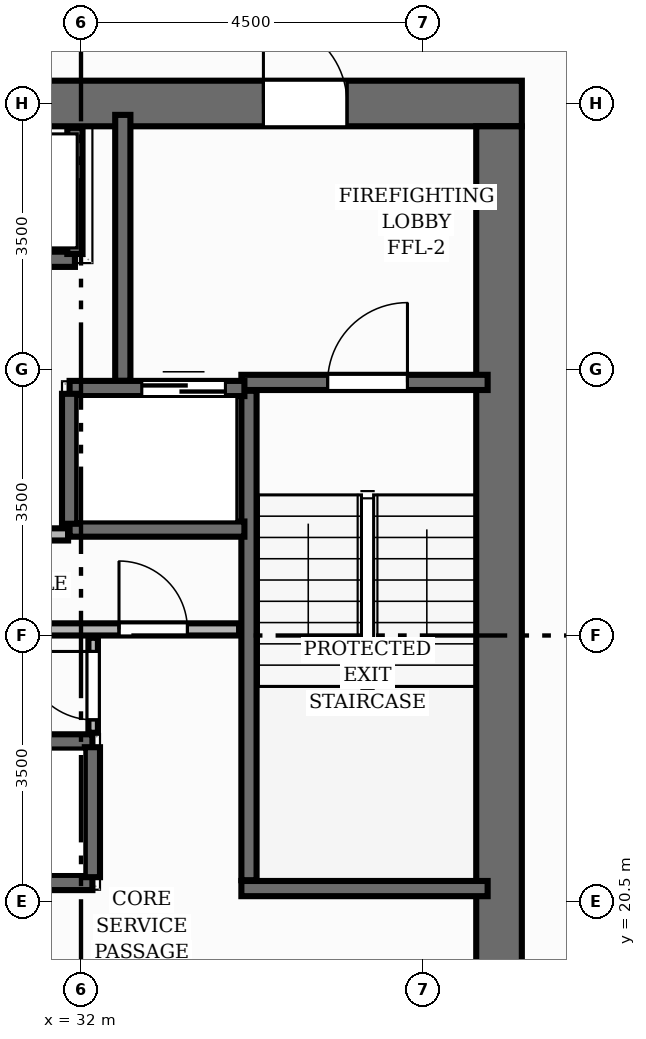
"""IFC4 building model, lengths in metres.
Left out: names, types, materials, properties, quantities, classifications, styles, units other than length and angle.
Written with IfcOpenShell. Run it as: python <this file> out.ifc"""

import sys

from ifc_helpers import new_model, si_unit, direction, frame, frame_2d, origin, place, context, subcontext, project, spatial, rectangle, extrude, element, fill, save


model = new_model("IFC4")
c1 = context("Model", 3, precision=1e-05, world=origin(), true_north=direction((0.0, 1.0)))
c2 = subcontext(c1, "Body", "Model", "MODEL_VIEW")
j1 = project(units=[si_unit("LENGTHUNIT", "METRE"), si_unit("PLANEANGLEUNIT", "RADIAN")], contexts=[c1])
p1 = place(None, origin())
s1 = spatial("IfcSite", under=j1, at=p1, CompositionType="ELEMENT")
p2 = place(p1, origin())
s2 = spatial("IfcBuilding", under=s1, at=p2, CompositionType="ELEMENT")
p3 = place(p2, frame((0.0, 0.0, 163.04)))
s3 = spatial("IfcBuildingStorey", under=s2, at=p3, CompositionType="ELEMENT", Elevation=163.04)
p4 = place(p3, frame((22.7, 31.0, 0.0), z_axis=(0.0, 0.0, 1.0), x_axis=(1.0, 0.0, 0.0)))
e1 = element("IfcWall", 1, at=p4, inside=s3, PredefinedType="SHEAR", context=c2, shape_type="SweptSolid", body=[
    extrude(rectangle(XDim=15.1, YDim=0.6, at=frame_2d((7.55, 0.0))), origin(), (0.0, 0.0, 1.0), 3.2),
])
p5 = place(p4, frame((11.7, 0.0, 0.0)))
e2 = element("IfcOpeningElement", 2, at=p5, cuts=e1, PredefinedType="OPENING", context=c2, shape_type="SweptSolid", body=[
    extrude(rectangle(XDim=1.1, YDim=2.15, at=frame_2d((0.55, 1.075))), frame((0.0, 0.31, 0.0), z_axis=(0.0, -1.0, 0.0), x_axis=(1.0, 0.0, 0.0)), (0.0, 0.0, 1.0), 0.62),
])
p6 = place(p4, frame((4.325, 0.0, 0.0)))
e3 = element("IfcOpeningElement", 3, at=p6, cuts=e1, PredefinedType="OPENING", context=c2, shape_type="SweptSolid", body=[
    extrude(rectangle(XDim=1.05, YDim=2.15, at=frame_2d((0.525, 1.075))), frame((0.0, 0.31, 0.0), z_axis=(0.0, -1.0, 0.0), x_axis=(1.0, 0.0, 0.0)), (0.0, 0.0, 1.0), 0.62),
])
p7 = place(p4, frame((6.075, 0.0, 0.0)))
e4 = element("IfcOpeningElement", 4, at=p7, cuts=e1, PredefinedType="OPENING", context=c2, shape_type="SweptSolid", body=[
    extrude(rectangle(XDim=1.05, YDim=2.15, at=frame_2d((0.525, 1.075))), frame((0.0, 0.31, 0.0), z_axis=(0.0, -1.0, 0.0), x_axis=(1.0, 0.0, 0.0)), (0.0, 0.0, 1.0), 0.62),
])
p8 = place(p4, frame((7.825, 0.0, 0.0)))
e5 = element("IfcOpeningElement", 5, at=p8, cuts=e1, PredefinedType="OPENING", context=c2, shape_type="SweptSolid", body=[
    extrude(rectangle(XDim=1.05, YDim=2.15, at=frame_2d((0.525, 1.075))), frame((0.0, 0.31, 0.0), z_axis=(0.0, -1.0, 0.0), x_axis=(1.0, 0.0, 0.0)), (0.0, 0.0, 1.0), 0.62),
])
p9 = place(p3, frame((37.5, 17.3, 0.0), z_axis=(0.0, 0.0, 1.0), x_axis=(0.0, 1.0, 0.0)))
e6 = element("IfcWall", 6, at=p9, inside=s3, PredefinedType="SHEAR", context=c2, shape_type="SweptSolid", body=[
    extrude(rectangle(XDim=13.4, YDim=0.6, at=frame_2d((6.7, 0.0))), origin(), (0.0, 0.0, 1.0), 3.2),
])
p10 = place(p3, frame((34.21, 20.78, 0.0), z_axis=(0.0, 0.0, 1.0), x_axis=(0.0, 1.0, 0.0)))
e7 = element("IfcWall", 7, at=p10, inside=s3, PredefinedType="SHEAR", context=c2, shape_type="SweptSolid", body=[
    extrude(rectangle(XDim=6.44, YDim=0.2, at=frame_2d((3.22, 0.0))), origin(), (0.0, 0.0, 1.0), 3.2),
])
p11 = place(p3, frame((34.11, 20.67, 0.0), z_axis=(0.0, 0.0, 1.0), x_axis=(1.0, 0.0, 0.0)))
e8 = element("IfcWall", 8, at=p11, inside=s3, PredefinedType="SHEAR", context=c2, shape_type="SweptSolid", body=[
    extrude(rectangle(XDim=3.24, YDim=0.2, at=frame_2d((1.62, 0.0))), origin(), (0.0, 0.0, 1.0), 3.2),
])
p12 = place(p3, frame((34.11, 27.33, 0.0), z_axis=(0.0, 0.0, 1.0), x_axis=(1.0, 0.0, 0.0)))
e9 = element("IfcWall", 9, at=p12, inside=s3, PredefinedType="SHEAR", context=c2, shape_type="SweptSolid", body=[
    extrude(rectangle(XDim=3.24, YDim=0.2, at=frame_2d((1.62, 0.0))), origin(), (0.0, 0.0, 1.0), 3.2),
])
p13 = place(p12, frame((1.135, 0.0, 0.0)))
e10 = element("IfcOpeningElement", 10, at=p13, cuts=e9, PredefinedType="OPENING", context=c2, shape_type="SweptSolid", body=[
    extrude(rectangle(XDim=1.05, YDim=2.15, at=frame_2d((0.525, 1.075))), frame((0.0, 0.11, 0.0), z_axis=(0.0, -1.0, 0.0), x_axis=(1.0, 0.0, 0.0)), (0.0, 0.0, 1.0), 0.22),
])
p14 = place(p3, frame((32.55, 27.35, 0.0), z_axis=(0.0, 0.0, 1.0), x_axis=(0.0, 1.0, 0.0)))
e11 = element("IfcWall", 11, at=p14, inside=s3, PredefinedType="SHEAR", context=c2, shape_type="SweptSolid", body=[
    extrude(rectangle(XDim=3.5, YDim=0.2, at=frame_2d((1.75, 0.0))), origin(), (0.0, 0.0, 1.0), 3.2),
])
p15 = place(p3, frame((29.85, 20.75, 0.0), z_axis=(0.0, 0.0, 1.0), x_axis=(1.0, 0.0, 0.0)))
e12 = element("IfcWall", 12, at=p15, inside=s3, PredefinedType="SHEAR", context=c2, shape_type="SweptSolid", body=[
    extrude(rectangle(XDim=2.3, YDim=0.2, at=frame_2d((1.15, 0.0))), origin(), (0.0, 0.0, 1.0), 3.2),
])
p16 = place(p15, frame((0.25, 0.0, 0.0)))
e13 = element("IfcOpeningElement", 13, at=p16, cuts=e12, PredefinedType="OPENING", context=c2, shape_type="SweptSolid", body=[
    extrude(rectangle(XDim=1.1, YDim=2.15, at=frame_2d((0.55, 1.075))), frame((0.0, 0.11, 0.0), z_axis=(0.0, -1.0, 0.0), x_axis=(1.0, 0.0, 0.0)), (0.0, 0.0, 1.0), 0.22),
])
p17 = place(p3, frame((29.85, 22.6, 0.0), z_axis=(0.0, 0.0, 1.0), x_axis=(1.0, 0.0, 0.0)))
e14 = element("IfcWall", 14, at=p17, inside=s3, PredefinedType="SHEAR", context=c2, shape_type="SweptSolid", body=[
    extrude(rectangle(XDim=2.3, YDim=0.2, at=frame_2d((1.15, 0.0))), origin(), (0.0, 0.0, 1.0), 3.2),
])
p18 = place(p3, frame((32.15, 20.82, 0.0), z_axis=(0.0, 0.0, 1.0), x_axis=(0.0, 1.0, 0.0)))
e15 = element("IfcWall", 15, at=p18, inside=s3, PredefinedType="SHEAR", context=c2, shape_type="SweptSolid", body=[
    extrude(rectangle(XDim=1.71, YDim=0.2, at=frame_2d((0.855, 0.0))), origin(), (0.0, 0.0, 1.0), 3.2),
])
p19 = place(p3, frame((31.85, 27.25, 0.0), z_axis=(0.0, 0.0, 1.0), x_axis=(1.0, 0.0, 0.0)))
e16 = element("IfcWall", 16, at=p19, inside=s3, PredefinedType="SHEAR", context=c2, shape_type="SweptSolid", body=[
    extrude(rectangle(XDim=2.3, YDim=0.2, at=frame_2d((1.15, 0.0))), origin(), (0.0, 0.0, 1.0), 3.2),
])
p20 = place(p19, frame((0.95, 0.0, 0.0)))
e17 = element("IfcOpeningElement", 17, at=p20, cuts=e16, PredefinedType="OPENING", context=c2, shape_type="SweptSolid", body=[
    extrude(rectangle(XDim=1.1, YDim=2.15, at=frame_2d((0.55, 1.075))), frame((0.0, 0.11, 0.0), z_axis=(0.0, -1.0, 0.0), x_axis=(1.0, 0.0, 0.0)), (0.0, 0.0, 1.0), 0.22),
])
p21 = place(p3, frame((31.85, 25.4, 0.0), z_axis=(0.0, 0.0, 1.0), x_axis=(1.0, 0.0, 0.0)))
e18 = element("IfcWall", 18, at=p21, inside=s3, PredefinedType="SHEAR", context=c2, shape_type="SweptSolid", body=[
    extrude(rectangle(XDim=2.3, YDim=0.2, at=frame_2d((1.15, 0.0))), origin(), (0.0, 0.0, 1.0), 3.2),
])
p22 = place(p3, frame((31.85, 25.47, 0.0), z_axis=(0.0, 0.0, 1.0), x_axis=(0.0, 1.0, 0.0)))
e19 = element("IfcWall", 19, at=p22, inside=s3, PredefinedType="SHEAR", context=c2, shape_type="SweptSolid", body=[
    extrude(rectangle(XDim=1.71, YDim=0.2, at=frame_2d((0.855, 0.0))), origin(), (0.0, 0.0, 1.0), 3.2),
])
p23 = place(p3, frame((26.68, 28.95, 0.0), z_axis=(0.0, 0.0, 1.0), x_axis=(1.0, 0.0, 0.0)))
e20 = element("IfcWall", 20, at=p23, inside=s3, PredefinedType="SHEAR", context=c2, shape_type="SweptSolid", body=[
    extrude(rectangle(XDim=5.24, YDim=0.2, at=frame_2d((2.62, 0.0))), origin(), (0.0, 0.0, 1.0), 3.2),
])
p24 = place(p3, frame((31.92, 29.02, 0.0), z_axis=(0.0, 0.0, 1.0), x_axis=(0.0, 1.0, 0.0)))
e21 = element("IfcWall", 21, at=p24, inside=s3, PredefinedType="SHEAR", context=c2, shape_type="SweptSolid", body=[
    extrude(rectangle(XDim=1.66, YDim=0.2, at=frame_2d((0.83, 0.0))), origin(), (0.0, 0.0, 1.0), 3.2),
])
p25 = place(p3, frame((29.95, 24.08, 0.0), z_axis=(0.0, 0.0, 1.0), x_axis=(1.0, 0.0, 0.0)))
e22 = element("IfcWall", 22, at=p25, inside=s3, PredefinedType="PLUMBINGWALL", context=c2, shape_type="SweptSolid", body=[
    extrude(rectangle(XDim=4.13, YDim=0.16, at=frame_2d((2.065, 0.0))), origin(), (0.0, 0.0, 1.0), 2.955),
])
p26 = place(p25, frame((2.55, 0.0, 0.0)))
e23 = element("IfcOpeningElement", 23, at=p26, cuts=e22, PredefinedType="OPENING", context=c2, shape_type="SweptSolid", body=[
    extrude(rectangle(XDim=0.9, YDim=2.1, at=frame_2d((0.45, 1.05))), frame((0.0, 0.09, 0.0), z_axis=(0.0, -1.0, 0.0), x_axis=(1.0, 0.0, 0.0)), (0.0, 0.0, 1.0), 0.18),
])
p27 = place(p3, frame((32.16, 22.72, 0.0), z_axis=(0.0, 0.0, 1.0), x_axis=(0.0, 1.0, 0.0)))
e24 = element("IfcWall", 24, at=p27, inside=s3, PredefinedType="PARTITIONING", context=c2, shape_type="SweptSolid", body=[
    extrude(rectangle(XDim=1.25, YDim=0.125, at=frame_2d((0.625, 0.0))), origin(), (0.0, 0.0, 1.0), 2.955),
])
p28 = place(p27, frame((0.17, 0.0, 0.0)))
e25 = element("IfcOpeningElement", 25, at=p28, cuts=e24, PredefinedType="OPENING", context=c2, shape_type="SweptSolid", body=[
    extrude(rectangle(XDim=0.9, YDim=2.1, at=frame_2d((0.45, 1.05))), frame((0.0, 0.073, 0.0), z_axis=(0.0, -1.0, 0.0), x_axis=(1.0, 0.0, 0.0)), (0.0, 0.0, 1.0), 0.145),
])
p29 = place(p3, frame((29.89, 25.33, 0.0), z_axis=(0.0, 0.0, 1.0), x_axis=(1.0, 0.0, 0.0)))
e26 = element("IfcWall", 26, at=p29, inside=s3, PredefinedType="PLUMBINGWALL", context=c2, shape_type="SweptSolid", body=[
    extrude(rectangle(XDim=1.94, YDim=0.16, at=frame_2d((0.97, 0.0))), origin(), (0.0, 0.0, 1.0), 2.955),
])
p30 = place(p13, origin())
e27 = element("IfcDoor", 27, at=p30, inside=s3, OperationType="SINGLE_SWING_RIGHT", PredefinedType="DOOR", context=c2, shape_type="SweptSolid", body=[
    extrude(rectangle(XDim=1.05, YDim=2.15, at=frame_2d((0.525, 1.075))), frame((0.0, 0.025, 0.0), z_axis=(0.0, -1.0, 0.0), x_axis=(1.0, 0.0, 0.0)), (0.0, 0.0, 1.0), 0.05),
])
fill(e10, e27)
p31 = place(p5, origin())
e28 = element("IfcDoor", 28, at=p31, inside=s3, OperationType="SINGLE_SWING_LEFT", PredefinedType="DOOR", context=c2, shape_type="SweptSolid", body=[
    extrude(rectangle(XDim=1.1, YDim=2.15, at=frame_2d((0.55, 1.075))), frame((0.0, 0.025, 0.0), z_axis=(0.0, -1.0, 0.0), x_axis=(1.0, 0.0, 0.0)), (0.0, 0.0, 1.0), 0.05),
])
fill(e2, e28)
p32 = place(p20, origin())
e29 = element("IfcDoor", 29, at=p32, inside=s3, OperationType="DOUBLE_DOOR_SLIDING", PredefinedType="DOOR", context=c2, shape_type="SweptSolid", body=[
    extrude(rectangle(XDim=1.1, YDim=2.15, at=frame_2d((0.55, 1.075))), frame((0.0, 0.025, 0.0), z_axis=(0.0, -1.0, 0.0), x_axis=(1.0, 0.0, 0.0)), (0.0, 0.0, 1.0), 0.05),
])
fill(e17, e29)
p33 = place(p26, origin())
e30 = element("IfcDoor", 30, at=p33, inside=s3, OperationType="SINGLE_SWING_LEFT", PredefinedType="DOOR", context=c2, shape_type="SweptSolid", body=[
    extrude(rectangle(XDim=0.9, YDim=2.1, at=frame_2d((0.45, 1.05))), frame((0.0, 0.025, 0.0), z_axis=(0.0, -1.0, 0.0), x_axis=(1.0, 0.0, 0.0)), (0.0, 0.0, 1.0), 0.05),
])
fill(e23, e30)
p34 = place(p28, origin())
e31 = element("IfcDoor", 31, at=p34, inside=s3, OperationType="SINGLE_SWING_RIGHT", PredefinedType="DOOR", context=c2, shape_type="SweptSolid", body=[
    extrude(rectangle(XDim=0.9, YDim=2.1, at=frame_2d((0.45, 1.05))), frame((0.0, 0.025, 0.0), z_axis=(0.0, -1.0, 0.0), x_axis=(1.0, 0.0, 0.0)), (0.0, 0.0, 1.0), 0.05),
])
fill(e25, e31)
save(model, sys.argv[1])
